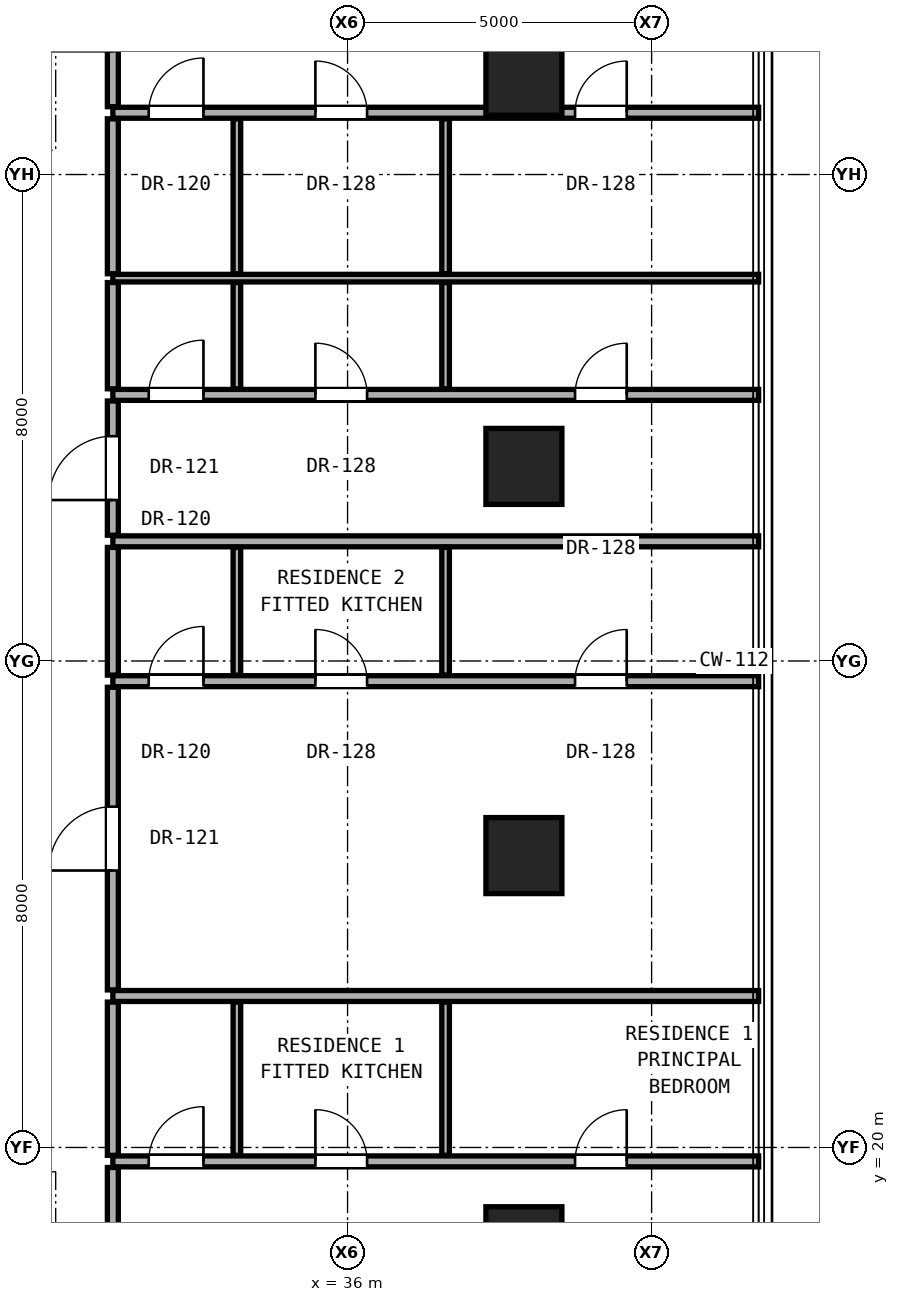
"""IFC4 building model, lengths in metres.
Left out: names, types, materials, properties, quantities, classifications, styles, units other than length and angle.
Written with IfcOpenShell. Run it as: python <this file> out.ifc"""

import sys

from ifc_helpers import new_model, si_unit, direction, frame, frame_2d, origin, origin_2d, place, context, subcontext, project, spatial, rectangle, hollow_rectangle, extrude, element, fill, save


model = new_model("IFC4")
c1 = context("Model", 3, precision=1e-05, world=origin(), true_north=direction((0.0, 1.0)))
c2 = subcontext(c1, "Body", "Model", "MODEL_VIEW")
j1 = project(units=[si_unit("LENGTHUNIT", "METRE"), si_unit("PLANEANGLEUNIT", "RADIAN")], contexts=[c1])
p1 = place(None, origin())
s1 = spatial("IfcSite", under=j1, at=p1, CompositionType="ELEMENT")
p2 = place(p1, origin())
s2 = spatial("IfcBuilding", under=s1, at=p2, CompositionType="ELEMENT")
p3 = place(p2, frame((0.0, 0.0, 71.9)))
s3 = spatial("IfcBuildingStorey", under=s2, at=p3, CompositionType="ELEMENT", Elevation=71.9)
for number, where, z_axis, x_axis in (
    (1, (38.9, 18.4, 0.0), (0.0, 0.0, 1.0), (1.0, 0.0, 0.0)),
    (2, (38.9, 24.8, 0.0), (0.0, 0.0, 1.0), (1.0, 0.0, 0.0)),
    (3, (38.9, 31.2, 0.0), (0.0, 0.0, 1.0), (1.0, 0.0, 0.0)),
    (4, (38.9, 37.6, 0.0), (0.0, 0.0, 1.0), (1.0, 0.0, 0.0)),
):
    element("IfcColumn", number, at=place(p3, frame(where, z_axis=z_axis, x_axis=x_axis)), inside=s3, PredefinedType="COLUMN", context=c2, shape_type="SweptSolid", body=[
        extrude(hollow_rectangle(XDim=1.25, YDim=1.25, WallThickness=0.07, at=origin_2d()), origin(), (0.0, 0.0, 1.0), 3.3),
    ])
p4 = place(p3, frame((32.14, 19.771, 0.0), z_axis=(0.0, 0.0, 1.0), x_axis=(1.0, 0.0, 0.0)))
e5 = element("IfcWall", 5, at=p4, inside=s3, PredefinedType="PARTITIONING", context=c2, shape_type="SweptSolid", body=[
    extrude(rectangle(XDim=10.62, YDim=0.18, at=frame_2d((5.31, 0.0))), origin(), (0.0, 0.0, 1.0), 2.125),
])
p5 = place(p4, frame((7.601, 0.0, 0.0)))
e6 = element("IfcOpeningElement", 6, at=p5, cuts=e5, PredefinedType="OPENING", context=c2, shape_type="SweptSolid", body=[
    extrude(rectangle(XDim=0.85, YDim=2.01, at=frame_2d((0.425, 1.005))), frame((0.0, 0.1, 0.0), z_axis=(0.0, -1.0, 0.0), x_axis=(1.0, 0.0, 0.0)), (0.0, 0.0, 1.0), 0.2),
])
p6 = place(p4, frame((3.331, 0.0, 0.0)))
e7 = element("IfcOpeningElement", 7, at=p6, cuts=e5, PredefinedType="OPENING", context=c2, shape_type="SweptSolid", body=[
    extrude(rectangle(XDim=0.85, YDim=2.01, at=frame_2d((0.425, 1.005))), frame((0.0, 0.1, 0.0), z_axis=(0.0, -1.0, 0.0), x_axis=(1.0, 0.0, 0.0)), (0.0, 0.0, 1.0), 0.2),
])
p7 = place(p4, frame((0.59, 0.0, 0.0)))
e8 = element("IfcOpeningElement", 8, at=p7, cuts=e5, PredefinedType="OPENING", context=c2, shape_type="SweptSolid", body=[
    extrude(rectangle(XDim=0.9, YDim=2.1, at=frame_2d((0.45, 1.05))), frame((0.0, 0.1, 0.0), z_axis=(0.0, -1.0, 0.0), x_axis=(1.0, 0.0, 0.0)), (0.0, 0.0, 1.0), 0.2),
])
p8 = place(p3, frame((32.14, 22.491, 0.0), z_axis=(0.0, 0.0, 1.0), x_axis=(1.0, 0.0, 0.0)))
e9 = element("IfcWall", 9, at=p8, inside=s3, PredefinedType="PARTITIONING", context=c2, shape_type="SweptSolid", body=[
    extrude(rectangle(XDim=10.62, YDim=0.18, at=frame_2d((5.31, 0.0))), origin(), (0.0, 0.0, 1.0), 2.125),
])
p9 = place(p3, frame((32.14, 27.668, 0.0), z_axis=(0.0, 0.0, 1.0), x_axis=(1.0, 0.0, 0.0)))
e10 = element("IfcWall", 10, at=p9, inside=s3, PredefinedType="PARTITIONING", context=c2, shape_type="SweptSolid", body=[
    extrude(rectangle(XDim=10.62, YDim=0.18, at=frame_2d((5.31, 0.0))), origin(), (0.0, 0.0, 1.0), 2.125),
])
p10 = place(p9, frame((7.601, 0.0, 0.0)))
e11 = element("IfcOpeningElement", 11, at=p10, cuts=e10, PredefinedType="OPENING", context=c2, shape_type="SweptSolid", body=[
    extrude(rectangle(XDim=0.85, YDim=2.01, at=frame_2d((0.425, 1.005))), frame((0.0, 0.1, 0.0), z_axis=(0.0, -1.0, 0.0), x_axis=(1.0, 0.0, 0.0)), (0.0, 0.0, 1.0), 0.2),
])
p11 = place(p9, frame((3.331, 0.0, 0.0)))
e12 = element("IfcOpeningElement", 12, at=p11, cuts=e10, PredefinedType="OPENING", context=c2, shape_type="SweptSolid", body=[
    extrude(rectangle(XDim=0.85, YDim=2.01, at=frame_2d((0.425, 1.005))), frame((0.0, 0.1, 0.0), z_axis=(0.0, -1.0, 0.0), x_axis=(1.0, 0.0, 0.0)), (0.0, 0.0, 1.0), 0.2),
])
p12 = place(p9, frame((0.59, 0.0, 0.0)))
e13 = element("IfcOpeningElement", 13, at=p12, cuts=e10, PredefinedType="OPENING", context=c2, shape_type="SweptSolid", body=[
    extrude(rectangle(XDim=0.9, YDim=2.1, at=frame_2d((0.45, 1.05))), frame((0.0, 0.1, 0.0), z_axis=(0.0, -1.0, 0.0), x_axis=(1.0, 0.0, 0.0)), (0.0, 0.0, 1.0), 0.2),
])
p13 = place(p3, frame((32.14, 29.968, 0.0), z_axis=(0.0, 0.0, 1.0), x_axis=(1.0, 0.0, 0.0)))
e14 = element("IfcWall", 14, at=p13, inside=s3, PredefinedType="PARTITIONING", context=c2, shape_type="SweptSolid", body=[
    extrude(rectangle(XDim=10.62, YDim=0.18, at=frame_2d((5.31, 0.0))), origin(), (0.0, 0.0, 1.0), 2.125),
])
p14 = place(p3, frame((32.14, 32.376, 0.0), z_axis=(0.0, 0.0, 1.0), x_axis=(1.0, 0.0, 0.0)))
e15 = element("IfcWall", 15, at=p14, inside=s3, PredefinedType="PARTITIONING", context=c2, shape_type="SweptSolid", body=[
    extrude(rectangle(XDim=10.62, YDim=0.18, at=frame_2d((5.31, 0.0))), origin(), (0.0, 0.0, 1.0), 2.125),
])
p15 = place(p14, frame((7.601, 0.0, 0.0)))
e16 = element("IfcOpeningElement", 16, at=p15, cuts=e15, PredefinedType="OPENING", context=c2, shape_type="SweptSolid", body=[
    extrude(rectangle(XDim=0.85, YDim=2.01, at=frame_2d((0.425, 1.005))), frame((0.0, 0.1, 0.0), z_axis=(0.0, -1.0, 0.0), x_axis=(1.0, 0.0, 0.0)), (0.0, 0.0, 1.0), 0.2),
])
p16 = place(p14, frame((3.331, 0.0, 0.0)))
e17 = element("IfcOpeningElement", 17, at=p16, cuts=e15, PredefinedType="OPENING", context=c2, shape_type="SweptSolid", body=[
    extrude(rectangle(XDim=0.85, YDim=2.01, at=frame_2d((0.425, 1.005))), frame((0.0, 0.1, 0.0), z_axis=(0.0, -1.0, 0.0), x_axis=(1.0, 0.0, 0.0)), (0.0, 0.0, 1.0), 0.2),
])
p17 = place(p14, frame((0.59, 0.0, 0.0)))
e18 = element("IfcOpeningElement", 18, at=p17, cuts=e15, PredefinedType="OPENING", context=c2, shape_type="SweptSolid", body=[
    extrude(rectangle(XDim=0.9, YDim=2.1, at=frame_2d((0.45, 1.05))), frame((0.0, 0.1, 0.0), z_axis=(0.0, -1.0, 0.0), x_axis=(1.0, 0.0, 0.0)), (0.0, 0.0, 1.0), 0.2),
])
p18 = place(p3, frame((32.14, 34.296, 0.0), z_axis=(0.0, 0.0, 1.0), x_axis=(1.0, 0.0, 0.0)))
e19 = element("IfcWall", 19, at=p18, inside=s3, PredefinedType="PARTITIONING", context=c2, shape_type="SweptSolid", body=[
    extrude(rectangle(XDim=10.62, YDim=0.125, at=frame_2d((5.31, 0.0))), origin(), (0.0, 0.0, 1.0), 2.125),
])
p19 = place(p3, frame((32.14, 37.016, 0.0), z_axis=(0.0, 0.0, 1.0), x_axis=(1.0, 0.0, 0.0)))
e20 = element("IfcWall", 20, at=p19, inside=s3, PredefinedType="PARTITIONING", context=c2, shape_type="SweptSolid", body=[
    extrude(rectangle(XDim=10.62, YDim=0.18, at=frame_2d((5.31, 0.0))), origin(), (0.0, 0.0, 1.0), 2.125),
])
p20 = place(p19, frame((7.601, 0.0, 0.0)))
e21 = element("IfcOpeningElement", 21, at=p20, cuts=e20, PredefinedType="OPENING", context=c2, shape_type="SweptSolid", body=[
    extrude(rectangle(XDim=0.85, YDim=2.01, at=frame_2d((0.425, 1.005))), frame((0.0, 0.1, 0.0), z_axis=(0.0, -1.0, 0.0), x_axis=(1.0, 0.0, 0.0)), (0.0, 0.0, 1.0), 0.2),
])
p21 = place(p19, frame((3.331, 0.0, 0.0)))
e22 = element("IfcOpeningElement", 22, at=p21, cuts=e20, PredefinedType="OPENING", context=c2, shape_type="SweptSolid", body=[
    extrude(rectangle(XDim=0.85, YDim=2.01, at=frame_2d((0.425, 1.005))), frame((0.0, 0.1, 0.0), z_axis=(0.0, -1.0, 0.0), x_axis=(1.0, 0.0, 0.0)), (0.0, 0.0, 1.0), 0.2),
])
p22 = place(p19, frame((0.59, 0.0, 0.0)))
e23 = element("IfcOpeningElement", 23, at=p22, cuts=e20, PredefinedType="OPENING", context=c2, shape_type="SweptSolid", body=[
    extrude(rectangle(XDim=0.9, YDim=2.1, at=frame_2d((0.45, 1.05))), frame((0.0, 0.1, 0.0), z_axis=(0.0, -1.0, 0.0), x_axis=(1.0, 0.0, 0.0)), (0.0, 0.0, 1.0), 0.2),
])
p23 = place(p3, frame((32.14, 14.112, 0.0), z_axis=(0.0, 0.0, 1.0), x_axis=(0.0, 1.0, 0.0)))
e24 = element("IfcWall", 24, at=p23, inside=s3, PredefinedType="PARTITIONING", context=c2, shape_type="SweptSolid", body=[
    extrude(rectangle(XDim=5.559, YDim=0.18, at=frame_2d((2.779, 0.0))), origin(), (0.0, 0.0, 1.0), 2.436),
])
p24 = place(p23, frame((2.854, 0.0, 0.0)))
e25 = element("IfcOpeningElement", 25, at=p24, cuts=e24, PredefinedType="OPENING", context=c2, shape_type="SweptSolid", body=[
    extrude(rectangle(XDim=1.05, YDim=2.2, at=frame_2d((0.525, 1.1))), frame((0.0, 0.1, 0.0), z_axis=(0.0, -1.0, 0.0), x_axis=(1.0, 0.0, 0.0)), (0.0, 0.0, 1.0), 0.2),
])
p25 = place(p3, frame((32.14, 19.871, 0.0), z_axis=(0.0, 0.0, 1.0), x_axis=(0.0, 1.0, 0.0)))
e26 = element("IfcWall", 26, at=p25, inside=s3, PredefinedType="PARTITIONING", context=c2, shape_type="SweptSolid", body=[
    extrude(rectangle(XDim=2.52, YDim=0.18, at=frame_2d((1.26, 0.0))), origin(), (0.0, 0.0, 1.0), 3.06),
])
p26 = place(p3, frame((32.14, 22.591, 0.0), z_axis=(0.0, 0.0, 1.0), x_axis=(0.0, 1.0, 0.0)))
e27 = element("IfcWall", 27, at=p26, inside=s3, PredefinedType="PARTITIONING", context=c2, shape_type="SweptSolid", body=[
    extrude(rectangle(XDim=4.977, YDim=0.18, at=frame_2d((2.489, 0.0))), origin(), (0.0, 0.0, 1.0), 2.279),
])
p27 = place(p26, frame((1.963, 0.0, 0.0)))
e28 = element("IfcOpeningElement", 28, at=p27, cuts=e27, PredefinedType="OPENING", context=c2, shape_type="SweptSolid", body=[
    extrude(rectangle(XDim=1.05, YDim=2.2, at=frame_2d((0.525, 1.1))), frame((0.0, 0.1, 0.0), z_axis=(0.0, -1.0, 0.0), x_axis=(1.0, 0.0, 0.0)), (0.0, 0.0, 1.0), 0.2),
])
p28 = place(p3, frame((32.14, 27.768, 0.0), z_axis=(0.0, 0.0, 1.0), x_axis=(0.0, 1.0, 0.0)))
e29 = element("IfcWall", 29, at=p28, inside=s3, PredefinedType="PARTITIONING", context=c2, shape_type="SweptSolid", body=[
    extrude(rectangle(XDim=2.1, YDim=0.18, at=frame_2d((1.05, 0.0))), origin(), (0.0, 0.0, 1.0), 3.06),
])
p29 = place(p3, frame((32.14, 30.068, 0.0), z_axis=(0.0, 0.0, 1.0), x_axis=(0.0, 1.0, 0.0)))
e30 = element("IfcWall", 30, at=p29, inside=s3, PredefinedType="PARTITIONING", context=c2, shape_type="SweptSolid", body=[
    extrude(rectangle(XDim=2.208, YDim=0.18, at=frame_2d((1.104, 0.0))), origin(), (0.0, 0.0, 1.0), 2.279),
])
p30 = place(p29, frame((0.579, 0.0, 0.0)))
e31 = element("IfcOpeningElement", 31, at=p30, cuts=e30, PredefinedType="OPENING", context=c2, shape_type="SweptSolid", body=[
    extrude(rectangle(XDim=1.05, YDim=2.2, at=frame_2d((0.525, 1.1))), frame((0.0, 0.1, 0.0), z_axis=(0.0, -1.0, 0.0), x_axis=(1.0, 0.0, 0.0)), (0.0, 0.0, 1.0), 0.2),
])
p31 = place(p3, frame((32.14, 32.476, 0.0), z_axis=(0.0, 0.0, 1.0), x_axis=(0.0, 1.0, 0.0)))
e32 = element("IfcWall", 32, at=p31, inside=s3, PredefinedType="PARTITIONING", context=c2, shape_type="SweptSolid", body=[
    extrude(rectangle(XDim=1.747, YDim=0.18, at=frame_2d((0.874, 0.0))), origin(), (0.0, 0.0, 1.0), 3.06),
])
p32 = place(p3, frame((32.14, 34.368, 0.0), z_axis=(0.0, 0.0, 1.0), x_axis=(0.0, 1.0, 0.0)))
e33 = element("IfcWall", 33, at=p32, inside=s3, PredefinedType="PARTITIONING", context=c2, shape_type="SweptSolid", body=[
    extrude(rectangle(XDim=2.548, YDim=0.18, at=frame_2d((1.274, 0.0))), origin(), (0.0, 0.0, 1.0), 3.06),
])
p33 = place(p3, frame((32.14, 37.116, 0.0), z_axis=(0.0, 0.0, 1.0), x_axis=(0.0, 1.0, 0.0)))
e34 = element("IfcWall", 34, at=p33, inside=s3, PredefinedType="PARTITIONING", context=c2, shape_type="SweptSolid", body=[
    extrude(rectangle(XDim=4.772, YDim=0.18, at=frame_2d((2.386, 0.0))), origin(), (0.0, 0.0, 1.0), 2.436),
])
p34 = place(p33, frame((0.911, 0.0, 0.0)))
e35 = element("IfcOpeningElement", 35, at=p34, cuts=e34, PredefinedType="OPENING", context=c2, shape_type="SweptSolid", body=[
    extrude(rectangle(XDim=1.05, YDim=2.2, at=frame_2d((0.525, 1.1))), frame((0.0, 0.1, 0.0), z_axis=(0.0, -1.0, 0.0), x_axis=(1.0, 0.0, 0.0)), (0.0, 0.0, 1.0), 0.2),
])
p35 = place(p3, frame((34.18, 19.871, 0.0), z_axis=(0.0, 0.0, 1.0), x_axis=(0.0, 1.0, 0.0)))
e36 = element("IfcWall", 36, at=p35, inside=s3, PredefinedType="PARTITIONING", context=c2, shape_type="SweptSolid", body=[
    extrude(rectangle(XDim=2.52, YDim=0.125, at=frame_2d((1.26, 0.0))), origin(), (0.0, 0.0, 1.0), 3.06),
])
p36 = place(p3, frame((34.18, 27.768, 0.0), z_axis=(0.0, 0.0, 1.0), x_axis=(0.0, 1.0, 0.0)))
e37 = element("IfcWall", 37, at=p36, inside=s3, PredefinedType="PARTITIONING", context=c2, shape_type="SweptSolid", body=[
    extrude(rectangle(XDim=2.1, YDim=0.125, at=frame_2d((1.05, 0.0))), origin(), (0.0, 0.0, 1.0), 3.06),
])
p37 = place(p3, frame((34.18, 32.476, 0.0), z_axis=(0.0, 0.0, 1.0), x_axis=(0.0, 1.0, 0.0)))
e38 = element("IfcWall", 38, at=p37, inside=s3, PredefinedType="PARTITIONING", context=c2, shape_type="SweptSolid", body=[
    extrude(rectangle(XDim=1.747, YDim=0.125, at=frame_2d((0.874, 0.0))), origin(), (0.0, 0.0, 1.0), 3.06),
])
p38 = place(p3, frame((34.18, 34.368, 0.0), z_axis=(0.0, 0.0, 1.0), x_axis=(0.0, 1.0, 0.0)))
e39 = element("IfcWall", 39, at=p38, inside=s3, PredefinedType="PARTITIONING", context=c2, shape_type="SweptSolid", body=[
    extrude(rectangle(XDim=2.548, YDim=0.125, at=frame_2d((1.274, 0.0))), origin(), (0.0, 0.0, 1.0), 3.06),
])
p39 = place(p3, frame((37.612, 19.871, 0.0), z_axis=(0.0, 0.0, 1.0), x_axis=(0.0, 1.0, 0.0)))
e40 = element("IfcWall", 40, at=p39, inside=s3, PredefinedType="PARTITIONING", context=c2, shape_type="SweptSolid", body=[
    extrude(rectangle(XDim=2.52, YDim=0.125, at=frame_2d((1.26, 0.0))), origin(), (0.0, 0.0, 1.0), 3.06),
])
p40 = place(p3, frame((37.612, 27.768, 0.0), z_axis=(0.0, 0.0, 1.0), x_axis=(0.0, 1.0, 0.0)))
e41 = element("IfcWall", 41, at=p40, inside=s3, PredefinedType="PARTITIONING", context=c2, shape_type="SweptSolid", body=[
    extrude(rectangle(XDim=2.1, YDim=0.125, at=frame_2d((1.05, 0.0))), origin(), (0.0, 0.0, 1.0), 3.06),
])
p41 = place(p3, frame((37.612, 32.476, 0.0), z_axis=(0.0, 0.0, 1.0), x_axis=(0.0, 1.0, 0.0)))
e42 = element("IfcWall", 42, at=p41, inside=s3, PredefinedType="PARTITIONING", context=c2, shape_type="SweptSolid", body=[
    extrude(rectangle(XDim=1.747, YDim=0.125, at=frame_2d((0.874, 0.0))), origin(), (0.0, 0.0, 1.0), 3.06),
])
p42 = place(p3, frame((37.612, 34.368, 0.0), z_axis=(0.0, 0.0, 1.0), x_axis=(0.0, 1.0, 0.0)))
e43 = element("IfcWall", 43, at=p42, inside=s3, PredefinedType="PARTITIONING", context=c2, shape_type="SweptSolid", body=[
    extrude(rectangle(XDim=2.548, YDim=0.125, at=frame_2d((1.274, 0.0))), origin(), (0.0, 0.0, 1.0), 3.06),
])
p43 = place(p5, origin())
e44 = element("IfcDoor", 44, at=p43, inside=s3, OperationType="SINGLE_SWING_RIGHT", PredefinedType="DOOR", context=c2, shape_type="SweptSolid", body=[
    extrude(rectangle(XDim=0.85, YDim=2.01, at=frame_2d((0.425, 1.005))), frame((0.0, 0.025, 0.0), z_axis=(0.0, -1.0, 0.0), x_axis=(1.0, 0.0, 0.0)), (0.0, 0.0, 1.0), 0.05),
])
fill(e6, e44)
p44 = place(p6, origin())
e45 = element("IfcDoor", 45, at=p44, inside=s3, OperationType="SINGLE_SWING_LEFT", PredefinedType="DOOR", context=c2, shape_type="SweptSolid", body=[
    extrude(rectangle(XDim=0.85, YDim=2.01, at=frame_2d((0.425, 1.005))), frame((0.0, 0.025, 0.0), z_axis=(0.0, -1.0, 0.0), x_axis=(1.0, 0.0, 0.0)), (0.0, 0.0, 1.0), 0.05),
])
fill(e7, e45)
p45 = place(p7, origin())
e46 = element("IfcDoor", 46, at=p45, inside=s3, OperationType="SINGLE_SWING_RIGHT", PredefinedType="DOOR", context=c2, shape_type="SweptSolid", body=[
    extrude(rectangle(XDim=0.9, YDim=2.1, at=frame_2d((0.45, 1.05))), frame((0.0, 0.025, 0.0), z_axis=(0.0, -1.0, 0.0), x_axis=(1.0, 0.0, 0.0)), (0.0, 0.0, 1.0), 0.05),
])
fill(e8, e46)
p46 = place(p27, origin())
e47 = element("IfcDoor", 47, at=p46, inside=s3, OperationType="SINGLE_SWING_LEFT", PredefinedType="DOOR", context=c2, shape_type="SweptSolid", body=[
    extrude(rectangle(XDim=1.05, YDim=2.2, at=frame_2d((0.525, 1.1))), frame((0.0, 0.025, 0.0), z_axis=(0.0, -1.0, 0.0), x_axis=(1.0, 0.0, 0.0)), (0.0, 0.0, 1.0), 0.05),
])
fill(e28, e47)
p47 = place(p10, origin())
e48 = element("IfcDoor", 48, at=p47, inside=s3, OperationType="SINGLE_SWING_RIGHT", PredefinedType="DOOR", context=c2, shape_type="SweptSolid", body=[
    extrude(rectangle(XDim=0.85, YDim=2.01, at=frame_2d((0.425, 1.005))), frame((0.0, 0.025, 0.0), z_axis=(0.0, -1.0, 0.0), x_axis=(1.0, 0.0, 0.0)), (0.0, 0.0, 1.0), 0.05),
])
fill(e11, e48)
p48 = place(p11, origin())
e49 = element("IfcDoor", 49, at=p48, inside=s3, OperationType="SINGLE_SWING_LEFT", PredefinedType="DOOR", context=c2, shape_type="SweptSolid", body=[
    extrude(rectangle(XDim=0.85, YDim=2.01, at=frame_2d((0.425, 1.005))), frame((0.0, 0.025, 0.0), z_axis=(0.0, -1.0, 0.0), x_axis=(1.0, 0.0, 0.0)), (0.0, 0.0, 1.0), 0.05),
])
fill(e12, e49)
p49 = place(p12, origin())
e50 = element("IfcDoor", 50, at=p49, inside=s3, OperationType="SINGLE_SWING_RIGHT", PredefinedType="DOOR", context=c2, shape_type="SweptSolid", body=[
    extrude(rectangle(XDim=0.9, YDim=2.1, at=frame_2d((0.45, 1.05))), frame((0.0, 0.025, 0.0), z_axis=(0.0, -1.0, 0.0), x_axis=(1.0, 0.0, 0.0)), (0.0, 0.0, 1.0), 0.05),
])
fill(e13, e50)
p50 = place(p30, origin())
e51 = element("IfcDoor", 51, at=p50, inside=s3, OperationType="SINGLE_SWING_LEFT", PredefinedType="DOOR", context=c2, shape_type="SweptSolid", body=[
    extrude(rectangle(XDim=1.05, YDim=2.2, at=frame_2d((0.525, 1.1))), frame((0.0, 0.025, 0.0), z_axis=(0.0, -1.0, 0.0), x_axis=(1.0, 0.0, 0.0)), (0.0, 0.0, 1.0), 0.05),
])
fill(e31, e51)
p51 = place(p15, origin())
e52 = element("IfcDoor", 52, at=p51, inside=s3, OperationType="SINGLE_SWING_RIGHT", PredefinedType="DOOR", context=c2, shape_type="SweptSolid", body=[
    extrude(rectangle(XDim=0.85, YDim=2.01, at=frame_2d((0.425, 1.005))), frame((0.0, 0.025, 0.0), z_axis=(0.0, -1.0, 0.0), x_axis=(1.0, 0.0, 0.0)), (0.0, 0.0, 1.0), 0.05),
])
fill(e16, e52)
p52 = place(p16, origin())
e53 = element("IfcDoor", 53, at=p52, inside=s3, OperationType="SINGLE_SWING_LEFT", PredefinedType="DOOR", context=c2, shape_type="SweptSolid", body=[
    extrude(rectangle(XDim=0.85, YDim=2.01, at=frame_2d((0.425, 1.005))), frame((0.0, 0.025, 0.0), z_axis=(0.0, -1.0, 0.0), x_axis=(1.0, 0.0, 0.0)), (0.0, 0.0, 1.0), 0.05),
])
fill(e17, e53)
p53 = place(p17, origin())
e54 = element("IfcDoor", 54, at=p53, inside=s3, OperationType="SINGLE_SWING_RIGHT", PredefinedType="DOOR", context=c2, shape_type="SweptSolid", body=[
    extrude(rectangle(XDim=0.9, YDim=2.1, at=frame_2d((0.45, 1.05))), frame((0.0, 0.025, 0.0), z_axis=(0.0, -1.0, 0.0), x_axis=(1.0, 0.0, 0.0)), (0.0, 0.0, 1.0), 0.05),
])
fill(e18, e54)
p54 = place(p20, origin())
e55 = element("IfcDoor", 55, at=p54, inside=s3, OperationType="SINGLE_SWING_RIGHT", PredefinedType="DOOR", context=c2, shape_type="SweptSolid", body=[
    extrude(rectangle(XDim=0.85, YDim=2.01, at=frame_2d((0.425, 1.005))), frame((0.0, 0.025, 0.0), z_axis=(0.0, -1.0, 0.0), x_axis=(1.0, 0.0, 0.0)), (0.0, 0.0, 1.0), 0.05),
])
fill(e21, e55)
p55 = place(p21, origin())
e56 = element("IfcDoor", 56, at=p55, inside=s3, OperationType="SINGLE_SWING_LEFT", PredefinedType="DOOR", context=c2, shape_type="SweptSolid", body=[
    extrude(rectangle(XDim=0.85, YDim=2.01, at=frame_2d((0.425, 1.005))), frame((0.0, 0.025, 0.0), z_axis=(0.0, -1.0, 0.0), x_axis=(1.0, 0.0, 0.0)), (0.0, 0.0, 1.0), 0.05),
])
fill(e22, e56)
p56 = place(p22, origin())
e57 = element("IfcDoor", 57, at=p56, inside=s3, OperationType="SINGLE_SWING_RIGHT", PredefinedType="DOOR", context=c2, shape_type="SweptSolid", body=[
    extrude(rectangle(XDim=0.9, YDim=2.1, at=frame_2d((0.45, 1.05))), frame((0.0, 0.025, 0.0), z_axis=(0.0, -1.0, 0.0), x_axis=(1.0, 0.0, 0.0)), (0.0, 0.0, 1.0), 0.05),
])
fill(e23, e57)
save(model, sys.argv[1])
